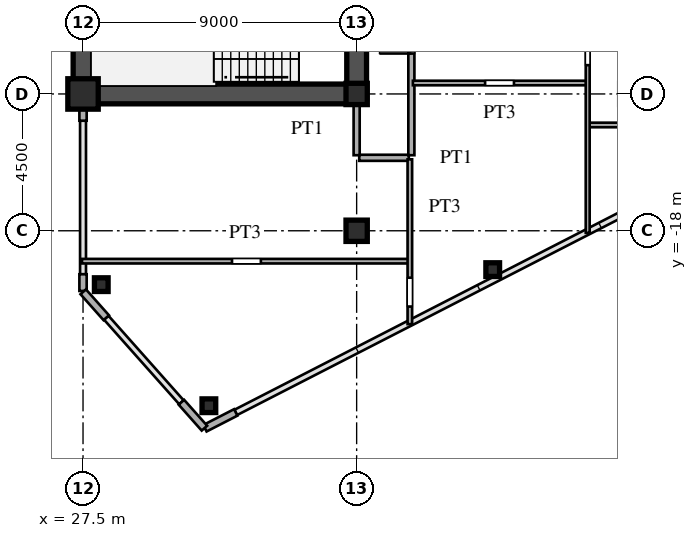
"""IFC4 building model, lengths in metres.
Left out: names, types, materials, properties, quantities, classifications, styles, units other than length and angle.
Written with IfcOpenShell. Run it as: python <this file> out.ifc"""

import sys

from ifc_helpers import new_model, si_unit, direction, frame, frame_2d, origin, origin_2d, place, context, subcontext, project, spatial, rectangle, hollow_rectangle, i_section, extrude, source, transform, mapped, element, fill, save


model = new_model("IFC4")
c1 = context("Model", 3, precision=1e-05, world=origin(), true_north=direction((0.0, 1.0)))
c2 = subcontext(c1, "Body", "Model", "MODEL_VIEW")
j1 = project(units=[si_unit("LENGTHUNIT", "METRE"), si_unit("PLANEANGLEUNIT", "RADIAN")], contexts=[c1])
p1 = place(None, origin())
s1 = spatial("IfcSite", under=j1, at=p1, CompositionType="ELEMENT")
p2 = place(p1, origin())
s2 = spatial("IfcBuilding", under=s1, at=p2, CompositionType="ELEMENT")
p3 = place(p2, frame((0.0, 0.0, 110.4)))
s3 = spatial("IfcBuildingStorey", under=s2, at=p3, CompositionType="ELEMENT", Elevation=110.4)
m1 = source(origin(), c2, "Body", "SweptSolid", [
    extrude(hollow_rectangle(XDim=1.0, YDim=1.0, WallThickness=0.042, at=origin_2d()), origin(), (0.0, 0.0, 1.0), 3.6),
])
p4 = place(p3, frame((27.5, -13.5, 0.0), z_axis=(0.0, 0.0, 1.0), x_axis=(1.0, 0.0, 0.0)))
e1 = element("IfcColumn", 1, at=p4, inside=s3, PredefinedType="COLUMN", context=c2, shape_type="MappedRepresentation", body=[
    mapped(m1, transform((0.0, 0.0, 0.0), scale=1.0)),
])
m2 = source(origin(), c2, "Body", "SweptSolid", [
    extrude(i_section(OverallWidth=0.7, OverallDepth=0.7, WebThickness=0.028, FlangeThickness=0.045, at=origin_2d()), origin(), (0.0, 0.0, 1.0), 3.6),
])
for number, where, z_axis, x_axis in (
    (2, (36.5, -18.0, 0.0), (0.0, 0.0, 1.0), (1.0, 0.0, 0.0)),
    (3, (36.5, -13.5, 0.0), (0.0, 0.0, 1.0), (1.0, 0.0, 0.0)),
):
    element("IfcColumn", number, at=place(p3, frame(where, z_axis=z_axis, x_axis=x_axis)), inside=s3, PredefinedType="COLUMN", context=c2, shape_type="MappedRepresentation", body=[
        mapped(m2, transform((0.0, 0.0, 0.0), scale=1.0)),
    ])
m3 = source(origin(), c2, "Body", "SweptSolid", [
    extrude(hollow_rectangle(XDim=0.45, YDim=0.45, WallThickness=0.018, at=origin_2d()), origin(), (0.0, 0.0, 1.0), 3.6),
])
for number, where, z_axis, x_axis in (
    (4, (31.64, -23.754, 0.0), (0.0, 0.0, 1.0), (1.0, 0.0, 0.0)),
    (5, (28.1, -19.772, 0.0), (0.0, 0.0, 1.0), (1.0, 0.0, 0.0)),
    (6, (40.976, -19.278, 0.0), (0.0, 0.0, 1.0), (1.0, 0.0, 0.0)),
):
    element("IfcColumn", number, at=place(p3, frame(where, z_axis=z_axis, x_axis=x_axis)), inside=s3, PredefinedType="COLUMN", context=c2, shape_type="MappedRepresentation", body=[
        mapped(m3, transform((0.0, 0.0, 0.0), scale=1.0)),
    ])
p5 = place(p3, frame((31.509, -24.495, 0.0), z_axis=(0.0, 0.0, 1.0), x_axis=(0.889797395748, 0.456355776255, 0.0)))
e7 = element("IfcWall", 7, at=p5, inside=s3, PredefinedType="SOLIDWALL", context=c2, shape_type="SweptSolid", body=[
    extrude(rectangle(XDim=1.14, YDim=0.24, at=frame_2d((0.57, 0.0))), origin(), (0.0, 0.0, 1.0), 3.38),
])
p6 = place(p3, frame((27.5, -19.98, 0.0), z_axis=(0.0, 0.0, 1.0), x_axis=(0.0, 1.0, 0.0)))
e8 = element("IfcWall", 8, at=p6, inside=s3, PredefinedType="SOLIDWALL", context=c2, shape_type="SweptSolid", body=[
    extrude(rectangle(XDim=0.55, YDim=0.24, at=frame_2d((0.275, 0.0))), origin(), (0.0, 0.0, 1.0), 3.38),
])
p7 = place(p3, frame((27.5, -14.38, 0.0), z_axis=(0.0, 0.0, 1.0), x_axis=(0.0, 1.0, 0.0)))
e9 = element("IfcWall", 9, at=p7, inside=s3, PredefinedType="SOLIDWALL", context=c2, shape_type="SweptSolid", body=[
    extrude(rectangle(XDim=0.55, YDim=0.24, at=frame_2d((0.275, 0.0))), origin(), (0.0, 0.0, 1.0), 2.88),
])
for number, where, z_axis, x_axis in (
    (10, (27.507, -20.008, 0.0), (0.0, 0.0, 1.0), (0.664, -0.747, 0.0)),
    (11, (30.736, -23.64, 0.0), (0.0, 0.0, 1.0), (0.664, -0.747, 0.0)),
):
    element("IfcWall", number, at=place(p3, frame(where, z_axis=z_axis, x_axis=x_axis)), inside=s3, PredefinedType="SOLIDWALL", context=c2, shape_type="SweptSolid", body=[
        extrude(rectangle(XDim=1.14, YDim=0.24, at=frame_2d((0.57, 0.0))), origin(), (0.0, 0.0, 1.0), 3.38),
    ])
p8 = place(p3, frame((27.5, -13.5, 0.0), z_axis=(0.0, 0.0, 1.0), x_axis=(0.0, 1.0, 0.0)))
e12 = element("IfcWall", 12, at=p8, inside=s3, PredefinedType="SHEAR", context=c2, shape_type="SweptSolid", body=[
    extrude(rectangle(XDim=12.2, YDim=0.65, at=frame_2d((6.1, 0.0))), origin(), (0.0, 0.0, 1.0), 3.38),
])
p9 = place(p3, frame((27.5, -13.5, 0.0), z_axis=(0.0, 0.0, 1.0), x_axis=(1.0, 0.0, 0.0)))
e13 = element("IfcWall", 13, at=p9, inside=s3, PredefinedType="SHEAR", context=c2, shape_type="SweptSolid", body=[
    extrude(rectangle(XDim=9.0, YDim=0.65, at=frame_2d((4.5, 0.0))), origin(), (0.0, 0.0, 1.0), 3.38),
])
p10 = place(p3, frame((36.5, -13.65, 0.0), z_axis=(0.0, 0.0, 1.0), x_axis=(0.0, 1.0, 0.0)))
e14 = element("IfcWall", 14, at=p10, inside=s3, PredefinedType="SHEAR", context=c2, shape_type="SweptSolid", body=[
    extrude(rectangle(XDim=7.15, YDim=0.65, at=frame_2d((3.575, 0.0))), origin(), (0.0, 0.0, 1.0), 3.38),
])
p11 = place(p10, frame((4.675, 0.0, 0.0)))
e15 = element("IfcOpeningElement", 15, at=p11, cuts=e14, PredefinedType="OPENING", context=c2, shape_type="SweptSolid", body=[
    extrude(rectangle(XDim=1.15, YDim=2.2, at=frame_2d((0.575, 1.1))), frame((0.0, 0.335, 0.0), z_axis=(0.0, -1.0, 0.0), x_axis=(1.0, 0.0, 0.0)), (0.0, 0.0, 1.0), 0.67),
])
p12 = place(p3, frame((27.465, -19.0, 0.0), z_axis=(0.0, 0.0, 1.0), x_axis=(1.0, 0.0, 0.0)))
e16 = element("IfcWall", 16, at=p12, inside=s3, PredefinedType="PARTITIONING", context=c2, shape_type="SweptSolid", body=[
    extrude(rectangle(XDim=10.735, YDim=0.15, at=frame_2d((5.367, 0.0))), origin(), (0.0, 0.0, 1.0), 3.38),
])
p13 = place(p12, frame((4.935, 0.0, 0.0)))
e17 = element("IfcOpeningElement", 17, at=p13, cuts=e16, PredefinedType="OPENING", context=c2, shape_type="SweptSolid", body=[
    extrude(rectangle(XDim=0.95, YDim=2.15, at=frame_2d((0.475, 1.075))), frame((0.0, 0.085, 0.0), z_axis=(0.0, -1.0, 0.0), x_axis=(1.0, 0.0, 0.0)), (0.0, 0.0, 1.0), 0.17),
])
p14 = place(p3, frame((36.585, -15.6, 0.0), z_axis=(0.0, 0.0, 1.0), x_axis=(1.0, 0.0, 0.0)))
e18 = element("IfcWall", 18, at=p14, inside=s3, PredefinedType="PARTITIONING", context=c2, shape_type="SweptSolid", body=[
    extrude(rectangle(XDim=1.63, YDim=0.2, at=frame_2d((0.815, 0.0))), origin(), (0.0, 0.0, 1.0), 3.38),
])
p15 = place(p3, frame((44.15, -14.52, 0.0), z_axis=(0.0, 0.0, 1.0), x_axis=(1.0, 0.0, 0.0)))
e19 = element("IfcWall", 19, at=p15, inside=s3, PredefinedType="PARTITIONING", context=c2, shape_type="SweptSolid", body=[
    extrude(rectangle(XDim=6.828, YDim=0.15, at=frame_2d((3.414, 0.0))), origin(), (0.0, 0.0, 1.0), 2.78),
])
p16 = place(p15, frame((2.896, 0.0, 0.0)))
e20 = element("IfcOpeningElement", 20, at=p16, cuts=e19, PredefinedType="OPENING", context=c2, shape_type="SweptSolid", body=[
    extrude(rectangle(XDim=0.95, YDim=2.15, at=frame_2d((0.475, 1.075))), frame((0.0, 0.085, 0.0), z_axis=(0.0, -1.0, 0.0), x_axis=(1.0, 0.0, 0.0)), (0.0, 0.0, 1.0), 0.17),
])
p17 = place(p3, frame((38.35, -13.14, 0.0), z_axis=(0.0, 0.0, 1.0), x_axis=(1.0, 0.0, 0.0)))
e21 = element("IfcWall", 21, at=p17, inside=s3, PredefinedType="PARTITIONING", context=c2, shape_type="SweptSolid", body=[
    extrude(rectangle(XDim=5.7, YDim=0.15, at=frame_2d((2.85, 0.0))), origin(), (0.0, 0.0, 1.0), 3.38),
])
p18 = place(p17, frame((2.375, 0.0, 0.0)))
e22 = element("IfcOpeningElement", 22, at=p18, cuts=e21, PredefinedType="OPENING", context=c2, shape_type="SweptSolid", body=[
    extrude(rectangle(XDim=0.95, YDim=2.15, at=frame_2d((0.475, 1.075))), frame((0.0, 0.085, 0.0), z_axis=(0.0, -1.0, 0.0), x_axis=(1.0, 0.0, 0.0)), (0.0, 0.0, 1.0), 0.17),
])
p19 = place(p3, frame((36.5, -15.515, 0.0), z_axis=(0.0, 0.0, 1.0), x_axis=(0.0, 1.0, 0.0)))
e23 = element("IfcWall", 23, at=p19, inside=s3, PredefinedType="PARTITIONING", context=c2, shape_type="SweptSolid", body=[
    extrude(rectangle(XDim=1.685, YDim=0.2, at=frame_2d((0.842, 0.0))), origin(), (0.0, 0.0, 1.0), 2.78),
])
p20 = place(p3, frame((38.25, -21.071, 0.0), z_axis=(0.0, 0.0, 1.0), x_axis=(0.0, 1.0, 0.0)))
e24 = element("IfcWall", 24, at=p20, inside=s3, PredefinedType="PARTITIONING", context=c2, shape_type="SweptSolid", body=[
    extrude(rectangle(XDim=5.421, YDim=0.15, at=frame_2d((2.71, 0.0))), origin(), (0.0, 0.0, 1.0), 3.38),
])
p21 = place(p20, frame((0.578, 0.0, 0.0)))
e25 = element("IfcOpeningElement", 25, at=p21, cuts=e24, PredefinedType="OPENING", context=c2, shape_type="SweptSolid", body=[
    extrude(rectangle(XDim=0.95, YDim=2.15, at=frame_2d((0.475, 1.075))), frame((0.0, 0.085, 0.0), z_axis=(0.0, -1.0, 0.0), x_axis=(1.0, 0.0, 0.0)), (0.0, 0.0, 1.0), 0.17),
])
p22 = place(p3, frame((38.3, -15.515, 0.0), z_axis=(0.0, 0.0, 1.0), x_axis=(0.0, 1.0, 0.0)))
e26 = element("IfcWall", 26, at=p22, inside=s3, PredefinedType="PARTITIONING", context=c2, shape_type="SweptSolid", body=[
    extrude(rectangle(XDim=31.03, YDim=0.2, at=frame_2d((15.515, 0.0))), origin(), (0.0, 0.0, 1.0), 3.38),
])
p23 = place(p22, frame((3.345, 0.0, 0.0)))
e27 = element("IfcOpeningElement", 27, at=p23, cuts=e26, PredefinedType="OPENING", context=c2, shape_type="SweptSolid", body=[
    extrude(rectangle(XDim=1.05, YDim=2.25, at=frame_2d((0.525, 1.125))), frame((0.0, 0.11, 0.0), z_axis=(0.0, -1.0, 0.0), x_axis=(1.0, 0.0, 0.0)), (0.0, 0.0, 1.0), 0.22),
])
p24 = place(p22, frame((14.28, 0.0, 0.0)))
e28 = element("IfcOpeningElement", 28, at=p24, cuts=e26, PredefinedType="OPENING", context=c2, shape_type="SweptSolid", body=[
    extrude(rectangle(XDim=1.05, YDim=2.25, at=frame_2d((0.525, 1.125))), frame((0.0, 0.11, 0.0), z_axis=(0.0, -1.0, 0.0), x_axis=(1.0, 0.0, 0.0)), (0.0, 0.0, 1.0), 0.22),
])
p25 = place(p22, frame((26.067, 0.0, 0.0)))
e29 = element("IfcOpeningElement", 29, at=p25, cuts=e26, PredefinedType="OPENING", context=c2, shape_type="SweptSolid", body=[
    extrude(rectangle(XDim=1.05, YDim=2.25, at=frame_2d((0.525, 1.125))), frame((0.0, 0.11, 0.0), z_axis=(0.0, -1.0, 0.0), x_axis=(1.0, 0.0, 0.0)), (0.0, 0.0, 1.0), 0.22),
])
p26 = place(p3, frame((44.1, -18.069, 0.0), z_axis=(0.0, 0.0, 1.0), x_axis=(0.0, 1.0, 0.0)))
e30 = element("IfcWall", 30, at=p26, inside=s3, PredefinedType="PARTITIONING", context=c2, shape_type="SweptSolid", body=[
    extrude(rectangle(XDim=19.852, YDim=0.13, at=frame_2d((9.926, 0.0))), origin(), (0.0, 0.0, 1.0), 3.38),
])
p27 = place(p26, frame((5.516, 0.0, 0.0)))
e31 = element("IfcOpeningElement", 31, at=p27, cuts=e30, PredefinedType="OPENING", context=c2, shape_type="SweptSolid", body=[
    extrude(rectangle(XDim=0.95, YDim=2.15, at=frame_2d((0.475, 1.075))), frame((0.0, 0.075, 0.0), z_axis=(0.0, -1.0, 0.0), x_axis=(1.0, 0.0, 0.0)), (0.0, 0.0, 1.0), 0.15),
])
p28 = place(p26, frame((17.094, 0.0, 0.0)))
e32 = element("IfcOpeningElement", 32, at=p28, cuts=e30, PredefinedType="OPENING", context=c2, shape_type="SweptSolid", body=[
    extrude(rectangle(XDim=0.95, YDim=2.15, at=frame_2d((0.475, 1.075))), frame((0.0, 0.075, 0.0), z_axis=(0.0, -1.0, 0.0), x_axis=(1.0, 0.0, 0.0)), (0.0, 0.0, 1.0), 0.15),
])
m4 = source(origin(), c2, "Body", "SweptSolid", [
    extrude(rectangle(XDim=1.05, YDim=2.25, at=frame_2d((0.525, 1.125))), frame((0.0, 0.025, 0.0), z_axis=(0.0, -1.0, 0.0), x_axis=(1.0, 0.0, 0.0)), (0.0, 0.0, 1.0), 0.05),
])
p29 = place(p23, origin())
e33 = element("IfcDoor", 33, at=p29, inside=s3, OperationType="SINGLE_SWING_LEFT", PredefinedType="DOOR", context=c2, shape_type="MappedRepresentation", body=[
    mapped(m4, transform((0.0, 0.0, 0.0), scale=1.0)),
])
fill(e27, e33)
save(model, sys.argv[1])
